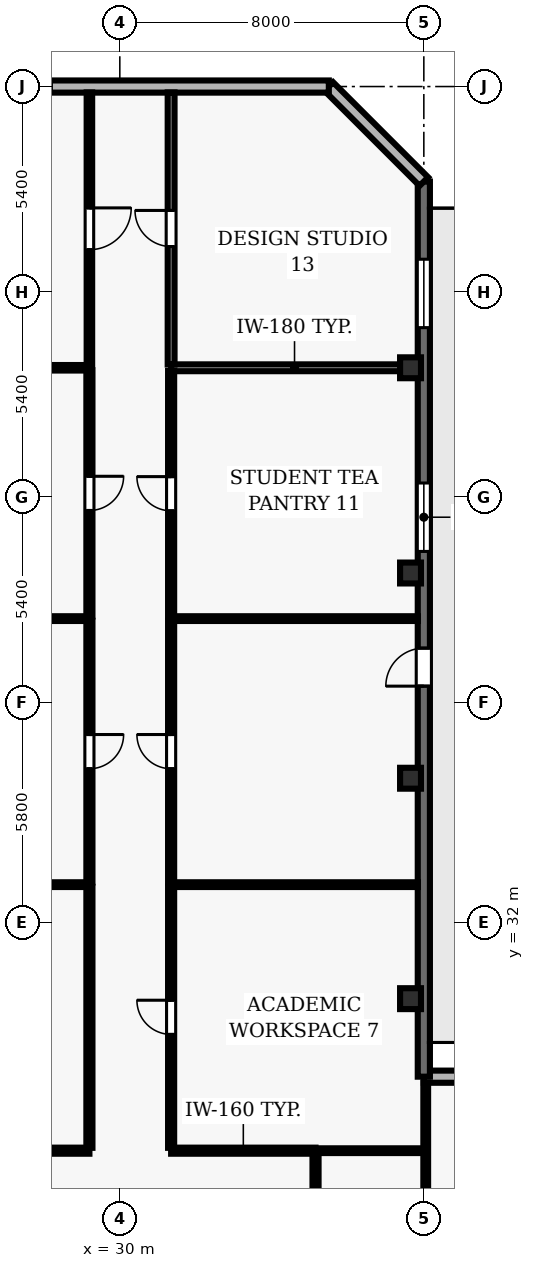
"""IFC4 building model, lengths in metres.
Left out: names, types, materials, properties, quantities, classifications, styles, units other than length and angle.
Written with IfcOpenShell. Run it as: python <this file> out.ifc"""

import sys

from ifc_helpers import new_model, si_unit, direction, frame, frame_2d, origin, origin_2d, place, context, subcontext, project, spatial, rectangle, hollow_rectangle, extrude, element, fill, save


model = new_model("IFC4")
c1 = context("Model", 3, precision=1e-05, world=origin(), true_north=direction((0.0, 1.0)))
c2 = subcontext(c1, "Body", "Model", "MODEL_VIEW")
j1 = project(units=[si_unit("LENGTHUNIT", "METRE"), si_unit("PLANEANGLEUNIT", "RADIAN")], contexts=[c1])
p1 = place(None, origin())
s1 = spatial("IfcSite", under=j1, at=p1, CompositionType="ELEMENT")
p2 = place(p1, origin())
s2 = spatial("IfcBuilding", under=s1, at=p2, CompositionType="ELEMENT")
p3 = place(p2, frame((0.0, 0.0, 46.6)))
s3 = spatial("IfcBuildingStorey", under=s2, at=p3, CompositionType="ELEMENT", Elevation=46.6)
for number, where, z_axis, x_axis in (
    (1, (37.65, 30.0, 0.0), (0.0, 0.0, 1.0), (1.0, 0.0, 0.0)),
    (2, (37.65, 35.8, 0.0), (0.0, 0.0, 1.0), (1.0, 0.0, 0.0)),
    (3, (37.65, 41.2, 0.0), (0.0, 0.0, 1.0), (1.0, 0.0, 0.0)),
    (4, (37.65, 46.6, 0.0), (0.0, 0.0, 1.0), (1.0, 0.0, 0.0)),
):
    element("IfcColumn", number, at=place(p3, frame(where, z_axis=z_axis, x_axis=x_axis)), inside=s3, PredefinedType="COLUMN", context=c2, shape_type="SweptSolid", body=[
        extrude(hollow_rectangle(XDim=0.55, YDim=0.55, WallThickness=0.025, at=origin_2d()), origin(), (0.0, 0.0, 1.0), 3.9),
    ])
p4 = place(p3, frame((52.85, 27.947, 0.0), z_axis=(0.0, 0.0, 1.0), x_axis=(-1.0, 0.0, 0.0)))
e5 = element("IfcWall", 5, at=p4, inside=s3, PredefinedType="SOLIDWALL", context=c2, shape_type="SweptSolid", body=[
    extrude(rectangle(XDim=14.85, YDim=0.32, at=frame_2d((7.425, 0.0))), origin(), (0.0, 0.0, 1.0), 3.69),
])
p5 = place(p4, frame((2.963, 0.0, 0.9)))
e6 = element("IfcOpeningElement", 6, at=p5, cuts=e5, PredefinedType="OPENING", context=c2, shape_type="SweptSolid", body=[
    extrude(rectangle(XDim=1.5, YDim=1.8, at=frame_2d((0.75, 0.9))), frame((0.0, 0.17, 0.0), z_axis=(0.0, -1.0, 0.0), x_axis=(1.0, 0.0, 0.0)), (0.0, 0.0, 1.0), 0.34),
])
p6 = place(p4, frame((10.388, 0.0, 0.9)))
e7 = element("IfcOpeningElement", 7, at=p6, cuts=e5, PredefinedType="OPENING", context=c2, shape_type="SweptSolid", body=[
    extrude(rectangle(XDim=1.5, YDim=1.8, at=frame_2d((0.75, 0.9))), frame((0.0, 0.17, 0.0), z_axis=(0.0, -1.0, 0.0), x_axis=(1.0, 0.0, 0.0)), (0.0, 0.0, 1.0), 0.34),
])
p7 = place(p3, frame((38.0, 27.947, 0.0), z_axis=(0.0, 0.0, 1.0), x_axis=(0.0, 1.0, 0.0)))
e8 = element("IfcWall", 8, at=p7, inside=s3, PredefinedType="SOLIDWALL", context=c2, shape_type="SweptSolid", body=[
    extrude(rectangle(XDim=23.553, YDim=0.32, at=frame_2d((11.776, 0.0))), origin(), (0.0, 0.0, 1.0), 3.69),
])
p8 = place(p7, frame((10.276, 0.0, 0.0)))
e9 = element("IfcOpeningElement", 9, at=p8, cuts=e8, PredefinedType="OPENING", context=c2, shape_type="SweptSolid", body=[
    extrude(rectangle(XDim=1.0, YDim=2.2, at=frame_2d((0.5, 1.1))), frame((0.0, 0.17, 0.0), z_axis=(0.0, -1.0, 0.0), x_axis=(1.0, 0.0, 0.0)), (0.0, 0.0, 1.0), 0.34),
])
p9 = place(p7, frame((13.821, 0.0, 0.9)))
e10 = element("IfcOpeningElement", 10, at=p9, cuts=e8, PredefinedType="OPENING", context=c2, shape_type="SweptSolid", body=[
    extrude(rectangle(XDim=1.8, YDim=1.8, at=frame_2d((0.9, 0.9))), frame((0.0, 0.17, 0.0), z_axis=(0.0, -1.0, 0.0), x_axis=(1.0, 0.0, 0.0)), (0.0, 0.0, 1.0), 0.34),
])
p10 = place(p7, frame((19.709, 0.0, 0.9)))
e11 = element("IfcOpeningElement", 11, at=p10, cuts=e8, PredefinedType="OPENING", context=c2, shape_type="SweptSolid", body=[
    extrude(rectangle(XDim=1.8, YDim=1.8, at=frame_2d((0.9, 0.9))), frame((0.0, 0.17, 0.0), z_axis=(0.0, -1.0, 0.0), x_axis=(1.0, 0.0, 0.0)), (0.0, 0.0, 1.0), 0.34),
])
p11 = place(p3, frame((38.0, 51.5, 0.0), z_axis=(0.0, 0.0, 1.0), x_axis=(-0.707106781187, 0.707106781187, 0.0)))
e12 = element("IfcWall", 12, at=p11, inside=s3, PredefinedType="SOLIDWALL", context=c2, shape_type="SweptSolid", body=[
    extrude(rectangle(XDim=3.536, YDim=0.32, at=frame_2d((1.768, 0.0))), origin(), (0.0, 0.0, 1.0), 3.69),
])
p12 = place(p3, frame((35.5, 54.0, 0.0), z_axis=(0.0, 0.0, 1.0), x_axis=(-1.0, 0.0, 0.0)))
e13 = element("IfcWall", 13, at=p12, inside=s3, PredefinedType="SOLIDWALL", context=c2, shape_type="SweptSolid", body=[
    extrude(rectangle(XDim=11.0, YDim=0.32, at=frame_2d((5.5, 0.0))), origin(), (0.0, 0.0, 1.0), 3.69),
])
p13 = place(p12, frame((7.3, 0.0, 0.9)))
e14 = element("IfcOpeningElement", 14, at=p13, cuts=e13, PredefinedType="OPENING", context=c2, shape_type="SweptSolid", body=[
    extrude(rectangle(XDim=2.8, YDim=1.8, at=frame_2d((1.4, 0.9))), frame((0.0, 0.17, 0.0), z_axis=(0.0, -1.0, 0.0), x_axis=(1.0, 0.0, 0.0)), (0.0, 0.0, 1.0), 0.34),
])
p14 = place(p3, frame((29.2, 26.0, 0.0), z_axis=(0.0, 0.0, 1.0), x_axis=(-1.0, 0.0, 0.0)))
e15 = element("IfcWall", 15, at=p14, inside=s3, PredefinedType="PARTITIONING", context=c2, shape_type="SweptSolid", body=[
    extrude(rectangle(XDim=7.045, YDim=0.16, at=frame_2d((3.522, 0.0))), origin(), (0.0, 0.0, 1.0), 3.69),
])
p15 = place(p14, frame((3.072, 0.0, 0.0)))
e16 = element("IfcOpeningElement", 16, at=p15, cuts=e15, PredefinedType="OPENING", context=c2, shape_type="SweptSolid", body=[
    extrude(rectangle(XDim=0.9, YDim=2.1, at=frame_2d((0.45, 1.05))), frame((0.0, 0.09, 0.0), z_axis=(0.0, -1.0, 0.0), x_axis=(1.0, 0.0, 0.0)), (0.0, 0.0, 1.0), 0.18),
])
p16 = place(p3, frame((29.2, 33.0, 0.0), z_axis=(0.0, 0.0, 1.0), x_axis=(-1.0, 0.0, 0.0)))
e17 = element("IfcWall", 17, at=p16, inside=s3, PredefinedType="PARTITIONING", context=c2, shape_type="SweptSolid", body=[
    extrude(rectangle(XDim=7.045, YDim=0.125, at=frame_2d((3.522, 0.0))), origin(), (0.0, 0.0, 1.0), 3.227),
])
p17 = place(p3, frame((29.2, 40.0, 0.0), z_axis=(0.0, 0.0, 1.0), x_axis=(-1.0, 0.0, 0.0)))
e18 = element("IfcWall", 18, at=p17, inside=s3, PredefinedType="PARTITIONING", context=c2, shape_type="SweptSolid", body=[
    extrude(rectangle(XDim=7.045, YDim=0.125, at=frame_2d((3.522, 0.0))), origin(), (0.0, 0.0, 1.0), 3.69),
])
p18 = place(p3, frame((29.2, 46.6, 0.0), z_axis=(0.0, 0.0, 1.0), x_axis=(-1.0, 0.0, 0.0)))
e19 = element("IfcWall", 19, at=p18, inside=s3, PredefinedType="PARTITIONING", context=c2, shape_type="SweptSolid", body=[
    extrude(rectangle(XDim=7.045, YDim=0.145, at=frame_2d((3.522, 0.0))), origin(), (0.0, 0.0, 1.0), 2.995),
])
p19 = place(p3, frame((35.15, 26.0, 0.0), z_axis=(0.0, 0.0, 1.0), x_axis=(-1.0, 0.0, 0.0)))
e20 = element("IfcWall", 20, at=p19, inside=s3, PredefinedType="PARTITIONING", context=c2, shape_type="SweptSolid", body=[
    extrude(rectangle(XDim=3.8, YDim=0.16, at=frame_2d((1.9, 0.0))), origin(), (0.0, 0.0, 1.0), 3.69),
])
p20 = place(p3, frame((35.15, 26.0, 0.0), z_axis=(0.0, 0.0, 1.0), x_axis=(1.0, 0.0, 0.0)))
e21 = element("IfcWall", 21, at=p20, inside=s3, PredefinedType="PARTITIONING", context=c2, shape_type="SweptSolid", body=[
    extrude(rectangle(XDim=2.7, YDim=0.125, at=frame_2d((1.35, 0.0))), origin(), (0.0, 0.0, 1.0), 3.69),
])
p21 = place(p3, frame((37.845, 33.0, 0.0), z_axis=(0.0, 0.0, 1.0), x_axis=(-1.0, 0.0, 0.0)))
e22 = element("IfcWall", 22, at=p21, inside=s3, PredefinedType="PARTITIONING", context=c2, shape_type="SweptSolid", body=[
    extrude(rectangle(XDim=6.495, YDim=0.125, at=frame_2d((3.248, 0.0))), origin(), (0.0, 0.0, 1.0), 3.227),
])
p22 = place(p3, frame((37.845, 40.0, 0.0), z_axis=(0.0, 0.0, 1.0), x_axis=(-1.0, 0.0, 0.0)))
e23 = element("IfcWall", 23, at=p22, inside=s3, PredefinedType="PARTITIONING", context=c2, shape_type="SweptSolid", body=[
    extrude(rectangle(XDim=6.495, YDim=0.125, at=frame_2d((3.248, 0.0))), origin(), (0.0, 0.0, 1.0), 3.69),
])
p23 = place(p3, frame((37.845, 46.6, 0.0), z_axis=(0.0, 0.0, 1.0), x_axis=(-1.0, 0.0, 0.0)))
e24 = element("IfcWall", 24, at=p23, inside=s3, PredefinedType="PARTITIONING", context=c2, shape_type="SweptSolid", body=[
    extrude(rectangle(XDim=6.495, YDim=0.18, at=frame_2d((3.248, 0.0))), origin(), (0.0, 0.0, 1.0), 2.995),
])
p24 = place(p3, frame((29.2, 32.943, 0.0), z_axis=(0.0, 0.0, 1.0), x_axis=(0.0, -1.0, 0.0)))
e25 = element("IfcWall", 25, at=p24, inside=s3, PredefinedType="PARTITIONING", context=c2, shape_type="SweptSolid", body=[
    extrude(rectangle(XDim=6.868, YDim=0.16, at=frame_2d((3.434, 0.0))), origin(), (0.0, 0.0, 1.0), 3.69),
])
p25 = place(p3, frame((29.2, 39.943, 0.0), z_axis=(0.0, 0.0, 1.0), x_axis=(0.0, -1.0, 0.0)))
e26 = element("IfcWall", 26, at=p25, inside=s3, PredefinedType="PARTITIONING", context=c2, shape_type="SweptSolid", body=[
    extrude(rectangle(XDim=6.886, YDim=0.16, at=frame_2d((3.443, 0.0))), origin(), (0.0, 0.0, 1.0), 3.69),
])
p26 = place(p25, frame((2.993, 0.0, 0.0)))
e27 = element("IfcOpeningElement", 27, at=p26, cuts=e26, PredefinedType="OPENING", context=c2, shape_type="SweptSolid", body=[
    extrude(rectangle(XDim=0.9, YDim=2.1, at=frame_2d((0.45, 1.05))), frame((0.0, 0.09, 0.0), z_axis=(0.0, -1.0, 0.0), x_axis=(1.0, 0.0, 0.0)), (0.0, 0.0, 1.0), 0.18),
])
p27 = place(p3, frame((29.2, 46.532, 0.0), z_axis=(0.0, 0.0, 1.0), x_axis=(0.0, -1.0, 0.0)))
e28 = element("IfcWall", 28, at=p27, inside=s3, PredefinedType="PARTITIONING", context=c2, shape_type="SweptSolid", body=[
    extrude(rectangle(XDim=6.475, YDim=0.16, at=frame_2d((3.238, 0.0))), origin(), (0.0, 0.0, 1.0), 3.69),
])
p28 = place(p27, frame((2.787, 0.0, 0.0)))
e29 = element("IfcOpeningElement", 29, at=p28, cuts=e28, PredefinedType="OPENING", context=c2, shape_type="SweptSolid", body=[
    extrude(rectangle(XDim=0.9, YDim=2.1, at=frame_2d((0.45, 1.05))), frame((0.0, 0.09, 0.0), z_axis=(0.0, -1.0, 0.0), x_axis=(1.0, 0.0, 0.0)), (0.0, 0.0, 1.0), 0.18),
])
p29 = place(p3, frame((29.2, 53.845, 0.0), z_axis=(0.0, 0.0, 1.0), x_axis=(0.0, -1.0, 0.0)))
e30 = element("IfcWall", 30, at=p29, inside=s3, PredefinedType="PARTITIONING", context=c2, shape_type="SweptSolid", body=[
    extrude(rectangle(XDim=7.177, YDim=0.145, at=frame_2d((3.588, 0.0))), origin(), (0.0, 0.0, 1.0), 3.69),
])
p30 = place(p29, frame((3.038, 0.0, 0.0)))
e31 = element("IfcOpeningElement", 31, at=p30, cuts=e30, PredefinedType="OPENING", context=c2, shape_type="SweptSolid", body=[
    extrude(rectangle(XDim=1.1, YDim=2.15, at=frame_2d((0.55, 1.075))), frame((0.0, 0.083, 0.0), z_axis=(0.0, -1.0, 0.0), x_axis=(1.0, 0.0, 0.0)), (0.0, 0.0, 1.0), 0.165),
])
p31 = place(p3, frame((31.35, 26.075, 0.0), z_axis=(0.0, 0.0, 1.0), x_axis=(0.0, 1.0, 0.0)))
e32 = element("IfcWall", 32, at=p31, inside=s3, PredefinedType="PARTITIONING", context=c2, shape_type="SweptSolid", body=[
    extrude(rectangle(XDim=6.868, YDim=0.16, at=frame_2d((3.434, 0.0))), origin(), (0.0, 0.0, 1.0), 3.69),
])
p32 = place(p31, frame((2.984, 0.0, 0.0)))
e33 = element("IfcOpeningElement", 33, at=p32, cuts=e32, PredefinedType="OPENING", context=c2, shape_type="SweptSolid", body=[
    extrude(rectangle(XDim=0.9, YDim=2.1, at=frame_2d((0.45, 1.05))), frame((0.0, 0.09, 0.0), z_axis=(0.0, -1.0, 0.0), x_axis=(1.0, 0.0, 0.0)), (0.0, 0.0, 1.0), 0.18),
])
p33 = place(p3, frame((31.35, 33.057, 0.0), z_axis=(0.0, 0.0, 1.0), x_axis=(0.0, 1.0, 0.0)))
e34 = element("IfcWall", 34, at=p33, inside=s3, PredefinedType="PARTITIONING", context=c2, shape_type="SweptSolid", body=[
    extrude(rectangle(XDim=6.886, YDim=0.16, at=frame_2d((3.443, 0.0))), origin(), (0.0, 0.0, 1.0), 3.69),
])
p34 = place(p33, frame((2.993, 0.0, 0.0)))
e35 = element("IfcOpeningElement", 35, at=p34, cuts=e34, PredefinedType="OPENING", context=c2, shape_type="SweptSolid", body=[
    extrude(rectangle(XDim=0.9, YDim=2.1, at=frame_2d((0.45, 1.05))), frame((0.0, 0.09, 0.0), z_axis=(0.0, -1.0, 0.0), x_axis=(1.0, 0.0, 0.0)), (0.0, 0.0, 1.0), 0.18),
])
p35 = place(p3, frame((31.35, 40.057, 0.0), z_axis=(0.0, 0.0, 1.0), x_axis=(0.0, 1.0, 0.0)))
e36 = element("IfcWall", 36, at=p35, inside=s3, PredefinedType="PARTITIONING", context=c2, shape_type="SweptSolid", body=[
    extrude(rectangle(XDim=6.458, YDim=0.16, at=frame_2d((3.229, 0.0))), origin(), (0.0, 0.0, 1.0), 3.69),
])
p36 = place(p35, frame((2.779, 0.0, 0.0)))
e37 = element("IfcOpeningElement", 37, at=p36, cuts=e36, PredefinedType="OPENING", context=c2, shape_type="SweptSolid", body=[
    extrude(rectangle(XDim=0.9, YDim=2.1, at=frame_2d((0.45, 1.05))), frame((0.0, 0.09, 0.0), z_axis=(0.0, -1.0, 0.0), x_axis=(1.0, 0.0, 0.0)), (0.0, 0.0, 1.0), 0.18),
])
p37 = place(p3, frame((31.35, 46.685, 0.0), z_axis=(0.0, 0.0, 1.0), x_axis=(0.0, 1.0, 0.0)))
e38 = element("IfcWall", 38, at=p37, inside=s3, PredefinedType="PARTITIONING", context=c2, shape_type="SweptSolid", body=[
    extrude(rectangle(XDim=7.16, YDim=0.18, at=frame_2d((3.58, 0.0))), origin(), (0.0, 0.0, 1.0), 3.69),
])
p38 = place(p37, frame((3.105, 0.0, 0.0)))
e39 = element("IfcOpeningElement", 39, at=p38, cuts=e38, PredefinedType="OPENING", context=c2, shape_type="SweptSolid", body=[
    extrude(rectangle(XDim=0.95, YDim=2.1, at=frame_2d((0.475, 1.05))), frame((0.0, 0.1, 0.0), z_axis=(0.0, -1.0, 0.0), x_axis=(1.0, 0.0, 0.0)), (0.0, 0.0, 1.0), 0.2),
])
p39 = place(p3, frame((35.15, 24.07, 0.0), z_axis=(0.0, 0.0, 1.0), x_axis=(0.0, 1.0, 0.0)))
e40 = element("IfcWall", 40, at=p39, inside=s3, PredefinedType="PARTITIONING", context=c2, shape_type="SweptSolid", body=[
    extrude(rectangle(XDim=1.855, YDim=0.16, at=frame_2d((0.927, 0.0))), origin(), (0.0, 0.0, 1.0), 3.69),
])
p40 = place(p3, frame((38.05, 27.792, 0.0), z_axis=(0.0, 0.0, 1.0), x_axis=(0.0, -1.0, 0.0)))
e41 = element("IfcWall", 41, at=p40, inside=s3, PredefinedType="PARTITIONING", context=c2, shape_type="SweptSolid", body=[
    extrude(rectangle(XDim=3.742, YDim=0.125, at=frame_2d((1.871, 0.0))), origin(), (0.0, 0.0, 1.0), 2.995),
])
p41 = place(p8, origin())
e42 = element("IfcDoor", 42, at=p41, inside=s3, OperationType="SINGLE_SWING_LEFT", PredefinedType="DOOR", context=c2, shape_type="SweptSolid", body=[
    extrude(rectangle(XDim=1.0, YDim=2.2, at=frame_2d((0.5, 1.1))), frame((0.0, 0.025, 0.0), z_axis=(0.0, -1.0, 0.0), x_axis=(1.0, 0.0, 0.0)), (0.0, 0.0, 1.0), 0.05),
])
fill(e9, e42)
p42 = place(p9, origin())
e43 = element("IfcWindow", 43, at=p42, inside=s3, PartitioningType="SINGLE_PANEL", PredefinedType="WINDOW", context=c2, shape_type="SweptSolid", body=[
    extrude(rectangle(XDim=1.8, YDim=1.8, at=frame_2d((0.9, 0.9))), frame((0.0, 0.03, 0.0), z_axis=(0.0, -1.0, 0.0), x_axis=(1.0, 0.0, 0.0)), (0.0, 0.0, 1.0), 0.06),
])
fill(e10, e43)
p43 = place(p10, origin())
e44 = element("IfcWindow", 44, at=p43, inside=s3, PartitioningType="SINGLE_PANEL", PredefinedType="WINDOW", context=c2, shape_type="SweptSolid", body=[
    extrude(rectangle(XDim=1.8, YDim=1.8, at=frame_2d((0.9, 0.9))), frame((0.0, 0.03, 0.0), z_axis=(0.0, -1.0, 0.0), x_axis=(1.0, 0.0, 0.0)), (0.0, 0.0, 1.0), 0.06),
])
fill(e11, e44)
p44 = place(p32, origin())
e45 = element("IfcDoor", 45, at=p44, inside=s3, OperationType="SINGLE_SWING_RIGHT", PredefinedType="DOOR", context=c2, shape_type="SweptSolid", body=[
    extrude(rectangle(XDim=0.9, YDim=2.1, at=frame_2d((0.45, 1.05))), frame((0.0, 0.025, 0.0), z_axis=(0.0, -1.0, 0.0), x_axis=(1.0, 0.0, 0.0)), (0.0, 0.0, 1.0), 0.05),
])
fill(e33, e45)
p45 = place(p26, origin())
e46 = element("IfcDoor", 46, at=p45, inside=s3, OperationType="SINGLE_SWING_LEFT", PredefinedType="DOOR", context=c2, shape_type="SweptSolid", body=[
    extrude(rectangle(XDim=0.9, YDim=2.1, at=frame_2d((0.45, 1.05))), frame((0.0, 0.025, 0.0), z_axis=(0.0, -1.0, 0.0), x_axis=(1.0, 0.0, 0.0)), (0.0, 0.0, 1.0), 0.05),
])
fill(e27, e46)
p46 = place(p34, origin())
e47 = element("IfcDoor", 47, at=p46, inside=s3, OperationType="SINGLE_SWING_RIGHT", PredefinedType="DOOR", context=c2, shape_type="SweptSolid", body=[
    extrude(rectangle(XDim=0.9, YDim=2.1, at=frame_2d((0.45, 1.05))), frame((0.0, 0.025, 0.0), z_axis=(0.0, -1.0, 0.0), x_axis=(1.0, 0.0, 0.0)), (0.0, 0.0, 1.0), 0.05),
])
fill(e35, e47)
p47 = place(p28, origin())
e48 = element("IfcDoor", 48, at=p47, inside=s3, OperationType="SINGLE_SWING_LEFT", PredefinedType="DOOR", context=c2, shape_type="SweptSolid", body=[
    extrude(rectangle(XDim=0.9, YDim=2.1, at=frame_2d((0.45, 1.05))), frame((0.0, 0.025, 0.0), z_axis=(0.0, -1.0, 0.0), x_axis=(1.0, 0.0, 0.0)), (0.0, 0.0, 1.0), 0.05),
])
fill(e29, e48)
p48 = place(p36, origin())
e49 = element("IfcDoor", 49, at=p48, inside=s3, OperationType="SINGLE_SWING_RIGHT", PredefinedType="DOOR", context=c2, shape_type="SweptSolid", body=[
    extrude(rectangle(XDim=0.9, YDim=2.1, at=frame_2d((0.45, 1.05))), frame((0.0, 0.025, 0.0), z_axis=(0.0, -1.0, 0.0), x_axis=(1.0, 0.0, 0.0)), (0.0, 0.0, 1.0), 0.05),
])
fill(e37, e49)
p49 = place(p30, origin())
e50 = element("IfcDoor", 50, at=p49, inside=s3, OperationType="SINGLE_SWING_LEFT", PredefinedType="DOOR", context=c2, shape_type="SweptSolid", body=[
    extrude(rectangle(XDim=1.1, YDim=2.15, at=frame_2d((0.55, 1.075))), frame((0.0, 0.025, 0.0), z_axis=(0.0, -1.0, 0.0), x_axis=(1.0, 0.0, 0.0)), (0.0, 0.0, 1.0), 0.05),
])
fill(e31, e50)
p50 = place(p38, origin())
e51 = element("IfcDoor", 51, at=p50, inside=s3, OperationType="SINGLE_SWING_RIGHT", PredefinedType="DOOR", context=c2, shape_type="SweptSolid", body=[
    extrude(rectangle(XDim=0.95, YDim=2.1, at=frame_2d((0.475, 1.05))), frame((0.0, 0.025, 0.0), z_axis=(0.0, -1.0, 0.0), x_axis=(1.0, 0.0, 0.0)), (0.0, 0.0, 1.0), 0.05),
])
fill(e39, e51)
save(model, sys.argv[1])
